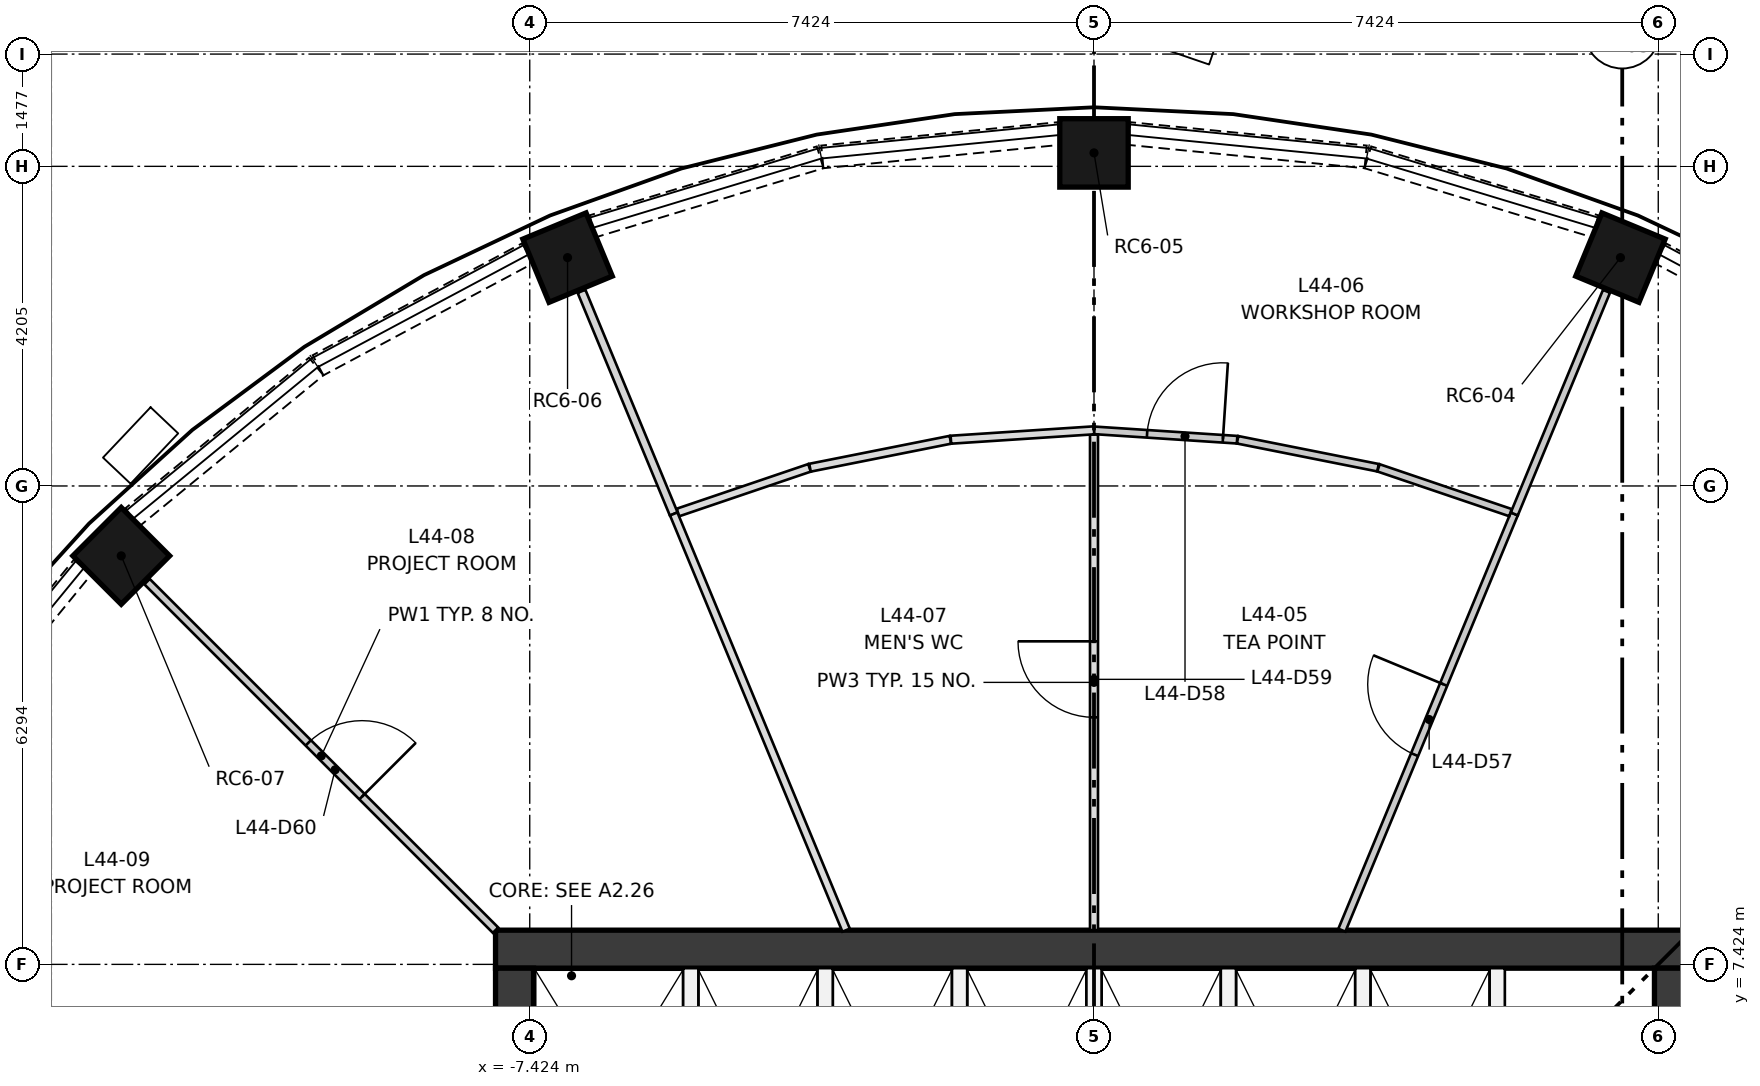
"""IFC4 building model, lengths in metres.
Left out: names, types, materials, properties, quantities, classifications, styles, units other than length and angle.
Written with IfcOpenShell. Run it as: python <this file> out.ifc"""

import sys

from ifc_helpers import new_model, si_unit, direction, frame, frame_2d, origin, origin_2d, place, context, subcontext, project, spatial, rectangle, extrude, element, fill, save


model = new_model("IFC4")
c1 = context("Model", 3, precision=1e-05, world=origin(), true_north=direction((0.0, 1.0)))
c2 = subcontext(c1, "Body", "Model", "MODEL_VIEW")
j1 = project(units=[si_unit("LENGTHUNIT", "METRE"), si_unit("PLANEANGLEUNIT", "RADIAN")], contexts=[c1])
p1 = place(None, origin())
s1 = spatial("IfcSite", under=j1, at=p1, CompositionType="ELEMENT")
p2 = place(p1, origin())
s2 = spatial("IfcBuilding", under=s1, at=p2, CompositionType="ELEMENT")
p3 = place(p2, frame((0.0, 0.0, 167.55)))
s3 = spatial("IfcBuildingStorey", under=s2, at=p3, CompositionType="ELEMENT", Elevation=167.55)
for number, where, z_axis, x_axis in (
    (1, (6.927, 16.722, 0.0), (0.0, 0.0, 1.0), (0.383, 0.924, 0.0)),
    (2, (0.0, 18.1, 0.0), (0.0, 0.0, 1.0), (0.0, 1.0, 0.0)),
    (3, (-6.927, 16.722, 0.0), (0.0, 0.0, 1.0), (-0.383, 0.924, 0.0)),
    (4, (-12.799, 12.799, 0.0), (0.0, 0.0, 1.0), (-0.707, 0.707, 0.0)),
):
    element("IfcColumn", number, at=place(p3, frame(where, z_axis=z_axis, x_axis=x_axis)), inside=s3, PredefinedType="COLUMN", context=c2, shape_type="SweptSolid", body=[
        extrude(rectangle(XDim=0.9, YDim=0.9, at=origin_2d()), origin(), (0.0, 0.0, 1.0), 3.35),
    ])
p4 = place(p3, frame((-7.874, 7.624, 0.0), z_axis=(0.0, 0.0, 1.0), x_axis=(1.0, 0.0, 0.0)))
e5 = element("IfcWall", 5, at=p4, inside=s3, PredefinedType="SHEAR", context=c2, shape_type="SweptSolid", body=[
    extrude(rectangle(XDim=15.748, YDim=0.5, at=frame_2d((7.874, 0.0))), origin(), (0.0, 0.0, 1.0), 3.35),
])
p5 = place(p3, frame((-7.624, -7.374, 0.0), z_axis=(0.0, 0.0, 1.0), x_axis=(0.0, 1.0, 0.0)))
e6 = element("IfcWall", 6, at=p5, inside=s3, PredefinedType="SHEAR", context=c2, shape_type="SweptSolid", body=[
    extrude(rectangle(XDim=14.748, YDim=0.5, at=frame_2d((7.374, 0.0))), origin(), (0.0, 0.0, 1.0), 3.35),
])
p6 = place(p5, frame((6.874, 0.0, 0.0)))
e7 = element("IfcOpeningElement", 7, at=p6, cuts=e6, PredefinedType="OPENING", context=c2, shape_type="SweptSolid", body=[
    extrude(rectangle(XDim=1.0, YDim=2.1, at=frame_2d((0.5, 1.05))), frame((0.0, 0.26, 0.0), z_axis=(0.0, -1.0, 0.0), x_axis=(1.0, 0.0, 0.0)), (0.0, 0.0, 1.0), 0.52),
])
p7 = place(p5, frame((3.75, 0.0, 0.0)))
e8 = element("IfcOpeningElement", 8, at=p7, cuts=e6, PredefinedType="OPENING", context=c2, shape_type="SweptSolid", body=[
    extrude(rectangle(XDim=1.8, YDim=2.1, at=frame_2d((0.9, 1.05))), frame((0.0, 0.26, 0.0), z_axis=(0.0, -1.0, 0.0), x_axis=(1.0, 0.0, 0.0)), (0.0, 0.0, 1.0), 0.52),
])
p8 = place(p5, frame((9.198, 0.0, 0.0)))
e9 = element("IfcOpeningElement", 9, at=p8, cuts=e6, PredefinedType="OPENING", context=c2, shape_type="SweptSolid", body=[
    extrude(rectangle(XDim=1.8, YDim=2.1, at=frame_2d((0.9, 1.05))), frame((0.0, 0.26, 0.0), z_axis=(0.0, -1.0, 0.0), x_axis=(1.0, 0.0, 0.0)), (0.0, 0.0, 1.0), 0.52),
])
p9 = place(p3, frame((7.624, -7.374, 0.0), z_axis=(0.0, 0.0, 1.0), x_axis=(0.0, 1.0, 0.0)))
e10 = element("IfcWall", 10, at=p9, inside=s3, PredefinedType="SHEAR", context=c2, shape_type="SweptSolid", body=[
    extrude(rectangle(XDim=14.748, YDim=0.5, at=frame_2d((7.374, 0.0))), origin(), (0.0, 0.0, 1.0), 3.35),
])
p10 = place(p9, frame((6.874, 0.0, 0.0)))
e11 = element("IfcOpeningElement", 11, at=p10, cuts=e10, PredefinedType="OPENING", context=c2, shape_type="SweptSolid", body=[
    extrude(rectangle(XDim=1.0, YDim=2.1, at=frame_2d((0.5, 1.05))), frame((0.0, 0.26, 0.0), z_axis=(0.0, -1.0, 0.0), x_axis=(1.0, 0.0, 0.0)), (0.0, 0.0, 1.0), 0.52),
])
p11 = place(p9, frame((3.75, 0.0, 0.0)))
e12 = element("IfcOpeningElement", 12, at=p11, cuts=e10, PredefinedType="OPENING", context=c2, shape_type="SweptSolid", body=[
    extrude(rectangle(XDim=1.8, YDim=2.1, at=frame_2d((0.9, 1.05))), frame((0.0, 0.26, 0.0), z_axis=(0.0, -1.0, 0.0), x_axis=(1.0, 0.0, 0.0)), (0.0, 0.0, 1.0), 0.52),
])
p12 = place(p9, frame((9.198, 0.0, 0.0)))
e13 = element("IfcOpeningElement", 13, at=p12, cuts=e10, PredefinedType="OPENING", context=c2, shape_type="SweptSolid", body=[
    extrude(rectangle(XDim=1.8, YDim=2.1, at=frame_2d((0.9, 1.05))), frame((0.0, 0.26, 0.0), z_axis=(0.0, -1.0, 0.0), x_axis=(1.0, 0.0, 0.0)), (0.0, 0.0, 1.0), 0.52),
])
for number, where, z_axis, x_axis in (
    (14, (-5.305, 4.174, 0.0), (0.0, 0.0, 1.0), (0.0, 1.0, 0.0)),
    (15, (-3.537, 4.174, 0.0), (0.0, 0.0, 1.0), (0.0, 1.0, 0.0)),
    (16, (-1.769, 4.174, 0.0), (0.0, 0.0, 1.0), (0.0, 1.0, 0.0)),
    (17, (0.0, 4.174, 0.0), (0.0, 0.0, 1.0), (0.0, 1.0, 0.0)),
    (18, (1.769, 4.174, 0.0), (0.0, 0.0, 1.0), (0.0, 1.0, 0.0)),
    (19, (3.537, 4.174, 0.0), (0.0, 0.0, 1.0), (0.0, 1.0, 0.0)),
    (20, (5.305, 4.174, 0.0), (0.0, 0.0, 1.0), (0.0, 1.0, 0.0)),
):
    element("IfcWall", number, at=place(p3, frame(where, z_axis=z_axis, x_axis=x_axis)), inside=s3, PredefinedType="PARTITIONING", context=c2, shape_type="SweptSolid", body=[
        extrude(rectangle(XDim=3.2, YDim=0.2, at=frame_2d((1.6, 0.0))), origin(), (0.0, 0.0, 1.0), 3.0),
    ])
p13 = place(p3, frame((10.209, 15.306, 0.0), z_axis=(0.0, 0.0, 1.0), x_axis=(-0.882024038027, 0.47120441036, 0.0)))
e21 = element("IfcWall", 21, at=p13, inside=s3, PredefinedType="SOLIDWALL", context=c2, shape_type="SweptSolid", body=[
    extrude(rectangle(XDim=3.125, YDim=0.3, at=frame_2d((1.562, 0.0))), origin(), (0.0, 0.0, 1.0), 0.9),
])
p14 = place(p3, frame((6.596, 17.135, 0.0), z_axis=(0.0, 0.0, 1.0), x_axis=(-0.957001416136, 0.290083245834, 0.0)))
e22 = element("IfcWall", 22, at=p14, inside=s3, PredefinedType="SOLIDWALL", context=c2, shape_type="SweptSolid", body=[
    extrude(rectangle(XDim=3.127, YDim=0.3, at=frame_2d((1.563, 0.0))), origin(), (0.0, 0.0, 1.0), 0.9),
])
for number, where, z_axis, x_axis in (
    (23, (3.574, 18.048, 0.0), (0.0, 0.0, 1.0), (-0.995, 0.098, 0.0)),
    (24, (-0.464, 18.354, 0.0), (0.0, 0.0, 1.0), (-0.995, -0.098, 0.0)),
):
    element("IfcWall", number, at=place(p3, frame(where, z_axis=z_axis, x_axis=x_axis)), inside=s3, PredefinedType="SOLIDWALL", context=c2, shape_type="SweptSolid", body=[
        extrude(rectangle(XDim=3.125, YDim=0.3, at=frame_2d((1.563, 0.0))), origin(), (0.0, 0.0, 1.0), 0.9),
    ])
p15 = place(p3, frame((-3.604, 18.042, 0.0), z_axis=(0.0, 0.0, 1.0), x_axis=(-0.957001416136, -0.290083245834, 0.0)))
e25 = element("IfcWall", 25, at=p15, inside=s3, PredefinedType="SOLIDWALL", context=c2, shape_type="SweptSolid", body=[
    extrude(rectangle(XDim=3.127, YDim=0.3, at=frame_2d((1.563, 0.0))), origin(), (0.0, 0.0, 1.0), 0.9),
])
p16 = place(p3, frame((-7.452, 16.779, 0.0), z_axis=(0.0, 0.0, 1.0), x_axis=(-0.882024038027, -0.47120441036, 0.0)))
e26 = element("IfcWall", 26, at=p16, inside=s3, PredefinedType="SOLIDWALL", context=c2, shape_type="SweptSolid", body=[
    extrude(rectangle(XDim=3.125, YDim=0.3, at=frame_2d((1.562, 0.0))), origin(), (0.0, 0.0, 1.0), 0.9),
])
for number, where, z_axis, x_axis in (
    (27, (-10.234, 15.29, 0.0), (0.0, 0.0, 1.0), (-0.773, -0.634, 0.0)),
    (28, (-13.306, 12.651, 0.0), (0.0, 0.0, 1.0), (-0.634, -0.773, 0.0)),
):
    element("IfcWall", number, at=place(p3, frame(where, z_axis=z_axis, x_axis=x_axis)), inside=s3, PredefinedType="SOLIDWALL", context=c2, shape_type="SweptSolid", body=[
        extrude(rectangle(XDim=3.127, YDim=0.3, at=frame_2d((1.563, 0.0))), origin(), (0.0, 0.0, 1.0), 0.9),
    ])
p17 = place(p3, frame((3.261, 7.874, 0.0), z_axis=(0.0, 0.0, 1.0), x_axis=(0.382690105068, 0.923876768559, 0.0)))
e29 = element("IfcWall", 29, at=p17, inside=s3, PredefinedType="PARTITIONING", context=c2, shape_type="SweptSolid", body=[
    extrude(rectangle(XDim=5.927, YDim=0.1, at=frame_2d((2.964, 0.0))), origin(), (0.0, 0.0, 1.0), 3.0),
])
p18 = place(p17, frame((2.5, 0.0, 0.0)))
e30 = element("IfcOpeningElement", 30, at=p18, cuts=e29, PredefinedType="OPENING", context=c2, shape_type="SweptSolid", body=[
    extrude(rectangle(XDim=1.0, YDim=2.1, at=frame_2d((0.5, 1.05))), frame((0.0, 0.06, 0.0), z_axis=(0.0, -1.0, 0.0), x_axis=(1.0, 0.0, 0.0)), (0.0, 0.0, 1.0), 0.12),
])
p19 = place(p3, frame((5.53, 13.35, 0.0), z_axis=(0.0, 0.0, 1.0), x_axis=(0.382689618566, 0.923876970079, 0.0)))
e31 = element("IfcWall", 31, at=p19, inside=s3, PredefinedType="PARTITIONING", context=c2, shape_type="SweptSolid", body=[
    extrude(rectangle(XDim=3.17, YDim=0.1, at=frame_2d((1.585, 0.0))), origin(), (0.0, 0.0, 1.0), 3.0),
])
p20 = place(p3, frame((0.0, 14.45, 0.0), z_axis=(0.0, 0.0, 1.0), x_axis=(0.997862900294, -0.065342422802, 0.0)))
e32 = element("IfcWall", 32, at=p20, inside=s3, PredefinedType="PARTITIONING", context=c2, shape_type="SweptSolid", body=[
    extrude(rectangle(XDim=1.887, YDim=0.1, at=frame_2d((0.943, 0.0))), origin(), (0.0, 0.0, 1.0), 3.0),
])
p21 = place(p20, frame((0.7, 0.0, 0.0)))
e33 = element("IfcOpeningElement", 33, at=p21, cuts=e32, PredefinedType="OPENING", context=c2, shape_type="SweptSolid", body=[
    extrude(rectangle(XDim=1.0, YDim=2.1, at=frame_2d((0.5, 1.05))), frame((0.0, 0.06, 0.0), z_axis=(0.0, -1.0, 0.0), x_axis=(1.0, 0.0, 0.0)), (0.0, 0.0, 1.0), 0.12),
])
p22 = place(p3, frame((1.889, 14.326, 0.0), z_axis=(0.0, 0.0, 1.0), x_axis=(0.980789493394, -0.195069140684, 0.0)))
e34 = element("IfcWall", 34, at=p22, inside=s3, PredefinedType="PARTITIONING", context=c2, shape_type="SweptSolid", body=[
    extrude(rectangle(XDim=1.884, YDim=0.1, at=frame_2d((0.942, 0.0))), origin(), (0.0, 0.0, 1.0), 3.0),
])
p23 = place(p3, frame((3.743, 13.957, 0.0), z_axis=(0.0, 0.0, 1.0), x_axis=(0.946938181516, -0.321415743839, 0.0)))
e35 = element("IfcWall", 35, at=p23, inside=s3, PredefinedType="PARTITIONING", context=c2, shape_type="SweptSolid", body=[
    extrude(rectangle(XDim=1.834, YDim=0.1, at=frame_2d((0.917, 0.0))), origin(), (0.0, 0.0, 1.0), 3.0),
])
p24 = place(p3, frame((0.0, 7.874, 0.0), z_axis=(0.0, 0.0, 1.0), x_axis=(0.0, 1.0, 0.0)))
e36 = element("IfcWall", 36, at=p24, inside=s3, PredefinedType="PARTITIONING", context=c2, shape_type="SweptSolid", body=[
    extrude(rectangle(XDim=6.52, YDim=0.105, at=frame_2d((3.26, 0.0))), origin(), (0.0, 0.0, 1.0), 3.0),
])
p25 = place(p24, frame((2.8, 0.0, 0.0)))
e37 = element("IfcOpeningElement", 37, at=p25, cuts=e36, PredefinedType="OPENING", context=c2, shape_type="SweptSolid", body=[
    extrude(rectangle(XDim=1.0, YDim=2.1, at=frame_2d((0.5, 1.05))), frame((0.0, 0.062, 0.0), z_axis=(0.0, -1.0, 0.0), x_axis=(1.0, 0.0, 0.0)), (0.0, 0.0, 1.0), 0.125),
])
p26 = place(p3, frame((-3.743, 13.957, 0.0), z_axis=(0.0, 0.0, 1.0), x_axis=(-0.946932980831, -0.321431065415, 0.0)))
e38 = element("IfcWall", 38, at=p26, inside=s3, PredefinedType="PARTITIONING", context=c2, shape_type="SweptSolid", body=[
    extrude(rectangle(XDim=1.828, YDim=0.105, at=frame_2d((0.914, 0.0))), origin(), (0.0, 0.0, 1.0), 3.0),
])
p27 = place(p3, frame((-1.889, 14.326, 0.0), z_axis=(0.0, 0.0, 1.0), x_axis=(-0.980784560384, -0.195093941763, 0.0)))
e39 = element("IfcWall", 39, at=p27, inside=s3, PredefinedType="PARTITIONING", context=c2, shape_type="SweptSolid", body=[
    extrude(rectangle(XDim=1.883, YDim=0.105, at=frame_2d((0.942, 0.0))), origin(), (0.0, 0.0, 1.0), 3.0),
])
p28 = place(p3, frame((0.0, 14.45, 0.0), z_axis=(0.0, 0.0, 1.0), x_axis=(-0.997862900294, -0.065342422802, 0.0)))
e40 = element("IfcWall", 40, at=p28, inside=s3, PredefinedType="PARTITIONING", context=c2, shape_type="SweptSolid", body=[
    extrude(rectangle(XDim=1.887, YDim=0.105, at=frame_2d((0.943, 0.0))), origin(), (0.0, 0.0, 1.0), 3.0),
])
p29 = place(p3, frame((-5.53, 13.35, 0.0), z_axis=(0.0, 0.0, 1.0), x_axis=(-0.382689618566, 0.923876970079, 0.0)))
e41 = element("IfcWall", 41, at=p29, inside=s3, PredefinedType="PARTITIONING", context=c2, shape_type="SweptSolid", body=[
    extrude(rectangle(XDim=3.17, YDim=0.11, at=frame_2d((1.585, 0.0))), origin(), (0.0, 0.0, 1.0), 3.0),
])
p30 = place(p3, frame((-3.261, 7.874, 0.0), z_axis=(0.0, 0.0, 1.0), x_axis=(-0.382690105068, 0.923876768559, 0.0)))
e42 = element("IfcWall", 42, at=p30, inside=s3, PredefinedType="PARTITIONING", context=c2, shape_type="SweptSolid", body=[
    extrude(rectangle(XDim=5.927, YDim=0.105, at=frame_2d((2.964, 0.0))), origin(), (0.0, 0.0, 1.0), 3.0),
])
p31 = place(p3, frame((-12.459, 12.459, 0.0), z_axis=(0.0, 0.0, 1.0), x_axis=(0.707106781187, -0.707106781187, 0.0)))
e43 = element("IfcWall", 43, at=p31, inside=s3, PredefinedType="PARTITIONING", context=c2, shape_type="SweptSolid", body=[
    extrude(rectangle(XDim=6.484, YDim=0.1, at=frame_2d((3.242, 0.0))), origin(), (0.0, 0.0, 1.0), 3.0),
])
p32 = place(p31, frame((3.0, 0.0, 0.0)))
e44 = element("IfcOpeningElement", 44, at=p32, cuts=e43, PredefinedType="OPENING", context=c2, shape_type="SweptSolid", body=[
    extrude(rectangle(XDim=1.0, YDim=2.1, at=frame_2d((0.5, 1.05))), frame((0.0, 0.06, 0.0), z_axis=(0.0, -1.0, 0.0), x_axis=(1.0, 0.0, 0.0)), (0.0, 0.0, 1.0), 0.12),
])
p33 = place(p18, origin())
e45 = element("IfcDoor", 45, at=p33, inside=s3, OperationType="SINGLE_SWING_RIGHT", PredefinedType="DOOR", context=c2, shape_type="SweptSolid", body=[
    extrude(rectangle(XDim=1.0, YDim=2.1, at=frame_2d((0.5, 1.05))), frame((0.0, 0.025, 0.0), z_axis=(0.0, -1.0, 0.0), x_axis=(1.0, 0.0, 0.0)), (0.0, 0.0, 1.0), 0.05),
])
fill(e30, e45)
p34 = place(p21, origin())
e46 = element("IfcDoor", 46, at=p34, inside=s3, OperationType="SINGLE_SWING_RIGHT", PredefinedType="DOOR", context=c2, shape_type="SweptSolid", body=[
    extrude(rectangle(XDim=1.0, YDim=2.1, at=frame_2d((0.5, 1.05))), frame((0.0, 0.025, 0.0), z_axis=(0.0, -1.0, 0.0), x_axis=(1.0, 0.0, 0.0)), (0.0, 0.0, 1.0), 0.05),
])
fill(e33, e46)
p35 = place(p25, origin())
e47 = element("IfcDoor", 47, at=p35, inside=s3, OperationType="SINGLE_SWING_RIGHT", PredefinedType="DOOR", context=c2, shape_type="SweptSolid", body=[
    extrude(rectangle(XDim=1.0, YDim=2.1, at=frame_2d((0.5, 1.05))), frame((0.0, 0.025, 0.0), z_axis=(0.0, -1.0, 0.0), x_axis=(1.0, 0.0, 0.0)), (0.0, 0.0, 1.0), 0.05),
])
fill(e37, e47)
p36 = place(p32, origin())
e48 = element("IfcDoor", 48, at=p36, inside=s3, OperationType="SINGLE_SWING_RIGHT", PredefinedType="DOOR", context=c2, shape_type="SweptSolid", body=[
    extrude(rectangle(XDim=1.0, YDim=2.1, at=frame_2d((0.5, 1.05))), frame((0.0, 0.025, 0.0), z_axis=(0.0, -1.0, 0.0), x_axis=(1.0, 0.0, 0.0)), (0.0, 0.0, 1.0), 0.05),
])
fill(e44, e48)
save(model, sys.argv[1])
